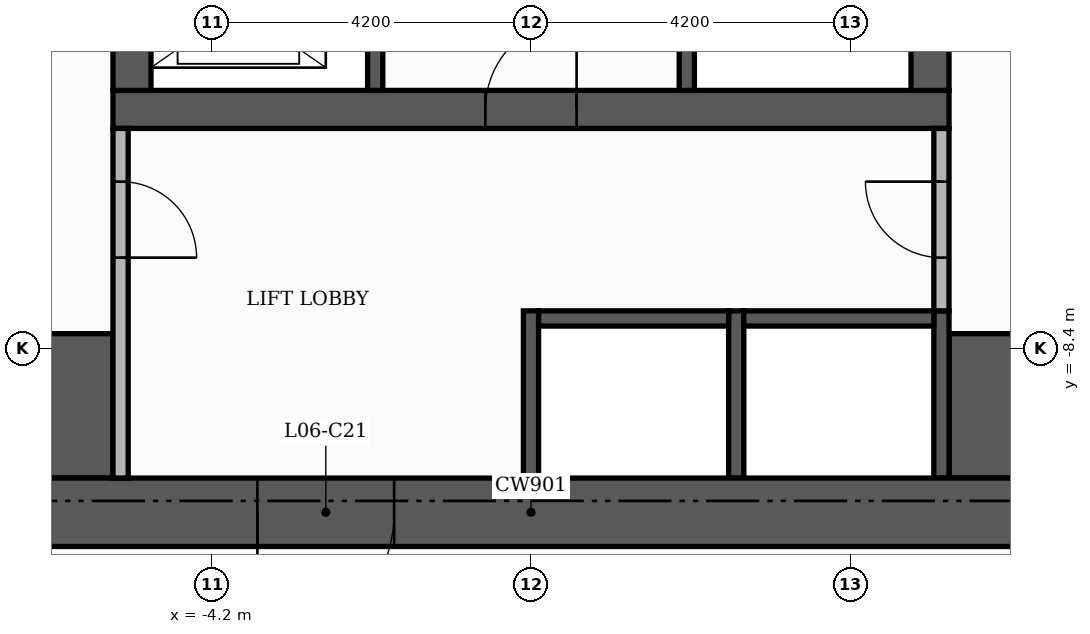
"""IFC4 building model, lengths in metres.
Left out: names, types, materials, properties, quantities, classifications, styles, units other than length and angle.
Written with IfcOpenShell. Run it as: python <this file> out.ifc"""

import sys

from ifc_helpers import new_model, si_unit, direction, frame, frame_2d, origin, place, context, subcontext, project, spatial, rectangle, extrude, element, fill, save


model = new_model("IFC4")
c1 = context("Model", 3, precision=1e-05, world=origin(), true_north=direction((0.0, 1.0)))
c2 = subcontext(c1, "Body", "Model", "MODEL_VIEW")
j1 = project(units=[si_unit("LENGTHUNIT", "METRE"), si_unit("PLANEANGLEUNIT", "RADIAN")], contexts=[c1])
p1 = place(None, origin())
s1 = spatial("IfcSite", under=j1, at=p1, CompositionType="ELEMENT")
p2 = place(p1, origin())
s2 = spatial("IfcBuilding", under=s1, at=p2, CompositionType="ELEMENT")
p3 = place(p2, frame((0.0, 0.0, 30.9)))
s3 = spatial("IfcBuildingStorey", under=s2, at=p3, CompositionType="ELEMENT", Elevation=30.9)
p4 = place(p3, frame((-5.5, -5.25, 0.0), z_axis=(0.0, 0.0, 1.0), x_axis=(1.0, 0.0, 0.0)))
e1 = element("IfcWall", 1, at=p4, inside=s3, PredefinedType="SHEAR", context=c2, shape_type="SweptSolid", body=[
    extrude(rectangle(XDim=11.0, YDim=0.5, at=frame_2d((5.5, 0.0))), origin(), (0.0, 0.0, 1.0), 3.48),
])
p5 = place(p4, frame((4.9, 0.0, 0.0)))
e2 = element("IfcOpeningElement", 2, at=p5, cuts=e1, PredefinedType="OPENING", context=c2, shape_type="SweptSolid", body=[
    extrude(rectangle(XDim=1.2, YDim=2.1, at=frame_2d((0.6, 1.05))), frame((0.0, 0.26, 0.0), z_axis=(0.0, -1.0, 0.0), x_axis=(1.0, 0.0, 0.0)), (0.0, 0.0, 1.0), 0.52),
])
for number, where, z_axis, x_axis in (
    (3, (-5.25, -5.0, 0.0), (0.0, 0.0, 1.0), (0.0, 1.0, 0.0)),
    (4, (5.25, -5.0, 0.0), (0.0, 0.0, 1.0), (0.0, 1.0, 0.0)),
):
    element("IfcWall", number, at=place(p3, frame(where, z_axis=z_axis, x_axis=x_axis)), inside=s3, PredefinedType="SHEAR", context=c2, shape_type="SweptSolid", body=[
        extrude(rectangle(XDim=10.5, YDim=0.5, at=frame_2d((5.25, 0.0))), origin(), (0.0, 0.0, 1.0), 3.48),
    ])
for number, where, z_axis, x_axis in (
    (5, (-10.1, -9.15, 0.0), (0.0, 0.0, 1.0), (1.0, 0.0, 0.0)),
    (6, (5.5, -9.15, 0.0), (0.0, 0.0, 1.0), (1.0, 0.0, 0.0)),
):
    element("IfcWall", number, at=place(p3, frame(where, z_axis=z_axis, x_axis=x_axis)), inside=s3, PredefinedType="SHEAR", context=c2, shape_type="SweptSolid", body=[
        extrude(rectangle(XDim=4.6, YDim=1.9, at=frame_2d((2.3, 0.0))), origin(), (0.0, 0.0, 1.0), 3.48),
    ])
p6 = place(p3, frame((2.05, -5.0, 0.0), z_axis=(0.0, 0.0, 1.0), x_axis=(0.0, 1.0, 0.0)))
e7 = element("IfcWall", 7, at=p6, inside=s3, PredefinedType="SHEAR", context=c2, shape_type="SweptSolid", body=[
    extrude(rectangle(XDim=6.6, YDim=0.2, at=frame_2d((3.3, 0.0))), origin(), (0.0, 0.0, 1.0), 3.48),
])
p7 = place(p6, frame((5.25, 0.0, 0.0)))
e8 = element("IfcOpeningElement", 8, at=p7, cuts=e7, PredefinedType="OPENING", context=c2, shape_type="SweptSolid", body=[
    extrude(rectangle(XDim=1.0, YDim=2.1, at=frame_2d((0.5, 1.05))), frame((0.0, 0.11, 0.0), z_axis=(0.0, -1.0, 0.0), x_axis=(1.0, 0.0, 0.0)), (0.0, 0.0, 1.0), 0.22),
])
for number, where, z_axis, x_axis in (
    (9, (0.0, -10.1, 0.0), (0.0, 0.0, 1.0), (0.0, 1.0, 0.0)),
    (10, (2.7, -10.1, 0.0), (0.0, 0.0, 1.0), (0.0, 1.0, 0.0)),
    (11, (5.4, -10.1, 0.0), (0.0, 0.0, 1.0), (0.0, 1.0, 0.0)),
):
    element("IfcWall", number, at=place(p3, frame(where, z_axis=z_axis, x_axis=x_axis)), inside=s3, PredefinedType="SHEAR", context=c2, shape_type="SweptSolid", body=[
        extrude(rectangle(XDim=2.2, YDim=0.2, at=frame_2d((1.1, 0.0))), origin(), (0.0, 0.0, 1.0), 3.48),
    ])
for number, where, z_axis, x_axis in (
    (12, (0.1, -8.0, 0.0), (0.0, 0.0, 1.0), (1.0, 0.0, 0.0)),
    (13, (2.8, -8.0, 0.0), (0.0, 0.0, 1.0), (1.0, 0.0, 0.0)),
):
    element("IfcWall", number, at=place(p3, frame(where, z_axis=z_axis, x_axis=x_axis)), inside=s3, PredefinedType="SHEAR", context=c2, shape_type="SweptSolid", body=[
        extrude(rectangle(XDim=2.5, YDim=0.2, at=frame_2d((1.25, 0.0))), origin(), (0.0, 0.0, 1.0), 3.48),
    ])
p8 = place(p3, frame((-2.05, -5.0, 0.0), z_axis=(0.0, 0.0, 1.0), x_axis=(0.0, 1.0, 0.0)))
e14 = element("IfcWall", 14, at=p8, inside=s3, PredefinedType="SHEAR", context=c2, shape_type="SweptSolid", body=[
    extrude(rectangle(XDim=3.4, YDim=0.2, at=frame_2d((1.7, 0.0))), origin(), (0.0, 0.0, 1.0), 3.48),
])
p9 = place(p8, frame((0.55, 0.0, 0.0)))
e15 = element("IfcOpeningElement", 15, at=p9, cuts=e14, PredefinedType="OPENING", context=c2, shape_type="SweptSolid", body=[
    extrude(rectangle(XDim=1.1, YDim=2.1, at=frame_2d((0.55, 1.05))), frame((0.0, 0.11, 0.0), z_axis=(0.0, -1.0, 0.0), x_axis=(1.0, 0.0, 0.0)), (0.0, 0.0, 1.0), 0.22),
])
p10 = place(p8, frame((2.45, 0.0, 0.0)))
e16 = element("IfcOpeningElement", 16, at=p10, cuts=e14, PredefinedType="OPENING", context=c2, shape_type="SweptSolid", body=[
    extrude(rectangle(XDim=0.8, YDim=2.1, at=frame_2d((0.4, 1.05))), frame((0.0, 0.11, 0.0), z_axis=(0.0, -1.0, 0.0), x_axis=(1.0, 0.0, 0.0)), (0.0, 0.0, 1.0), 0.22),
])
p11 = place(p3, frame((-11.0, -10.55, 0.0), z_axis=(0.0, 0.0, 1.0), x_axis=(1.0, 0.0, 0.0)))
e17 = element("IfcWall", 17, at=p11, inside=s3, PredefinedType="SHEAR", context=c2, shape_type="SweptSolid", body=[
    extrude(rectangle(XDim=22.0, YDim=0.9, at=frame_2d((11.0, 0.0))), origin(), (0.0, 0.0, 1.0), 3.48),
])
p12 = place(p11, frame((7.4, 0.0, 0.0)))
e18 = element("IfcOpeningElement", 18, at=p12, cuts=e17, PredefinedType="OPENING", context=c2, shape_type="SweptSolid", body=[
    extrude(rectangle(XDim=1.8, YDim=2.2, at=frame_2d((0.9, 1.1))), frame((0.0, 0.46, 0.0), z_axis=(0.0, -1.0, 0.0), x_axis=(1.0, 0.0, 0.0)), (0.0, 0.0, 1.0), 0.92),
])
p13 = place(p3, frame((-5.4, -10.1, 0.0), z_axis=(0.0, 0.0, 1.0), x_axis=(0.0, 1.0, 0.0)))
e19 = element("IfcWall", 19, at=p13, inside=s3, PredefinedType="PARTITIONING", context=c2, shape_type="SweptSolid", body=[
    extrude(rectangle(XDim=4.6, YDim=0.2, at=frame_2d((2.3, 0.0))), origin(), (0.0, 0.0, 1.0), 3.48),
])
p14 = place(p13, frame((2.9, 0.0, 0.0)))
e20 = element("IfcOpeningElement", 20, at=p14, cuts=e19, PredefinedType="OPENING", context=c2, shape_type="SweptSolid", body=[
    extrude(rectangle(XDim=1.0, YDim=2.1, at=frame_2d((0.5, 1.05))), frame((0.0, 0.11, 0.0), z_axis=(0.0, -1.0, 0.0), x_axis=(1.0, 0.0, 0.0)), (0.0, 0.0, 1.0), 0.22),
])
p15 = place(p3, frame((5.4, -7.9, 0.0), z_axis=(0.0, 0.0, 1.0), x_axis=(0.0, 1.0, 0.0)))
e21 = element("IfcWall", 21, at=p15, inside=s3, PredefinedType="PARTITIONING", context=c2, shape_type="SweptSolid", body=[
    extrude(rectangle(XDim=2.4, YDim=0.2, at=frame_2d((1.2, 0.0))), origin(), (0.0, 0.0, 1.0), 3.48),
])
p16 = place(p15, frame((0.7, 0.0, 0.0)))
e22 = element("IfcOpeningElement", 22, at=p16, cuts=e21, PredefinedType="OPENING", context=c2, shape_type="SweptSolid", body=[
    extrude(rectangle(XDim=1.0, YDim=2.1, at=frame_2d((0.5, 1.05))), frame((0.0, 0.11, 0.0), z_axis=(0.0, -1.0, 0.0), x_axis=(1.0, 0.0, 0.0)), (0.0, 0.0, 1.0), 0.22),
])
p17 = place(p5, origin())
e23 = element("IfcDoor", 23, at=p17, inside=s3, OperationType="SINGLE_SWING_RIGHT", PredefinedType="DOOR", context=c2, shape_type="SweptSolid", body=[
    extrude(rectangle(XDim=1.2, YDim=2.1, at=frame_2d((0.6, 1.05))), frame((0.0, 0.025, 0.0), z_axis=(0.0, -1.0, 0.0), x_axis=(1.0, 0.0, 0.0)), (0.0, 0.0, 1.0), 0.05),
])
fill(e2, e23)
p18 = place(p14, frame((1.0, 0.0, 0.0), z_axis=(0.0, 0.0, 1.0), x_axis=(-1.0, 0.0, 0.0)))
e24 = element("IfcDoor", 24, at=p18, inside=s3, OperationType="SINGLE_SWING_LEFT", PredefinedType="DOOR", context=c2, shape_type="SweptSolid", body=[
    extrude(rectangle(XDim=1.0, YDim=2.1, at=frame_2d((0.5, 1.05))), frame((0.0, 0.025, 0.0), z_axis=(0.0, -1.0, 0.0), x_axis=(1.0, 0.0, 0.0)), (0.0, 0.0, 1.0), 0.05),
])
fill(e20, e24)
p19 = place(p16, origin())
e25 = element("IfcDoor", 25, at=p19, inside=s3, OperationType="SINGLE_SWING_RIGHT", PredefinedType="DOOR", context=c2, shape_type="SweptSolid", body=[
    extrude(rectangle(XDim=1.0, YDim=2.1, at=frame_2d((0.5, 1.05))), frame((0.0, 0.025, 0.0), z_axis=(0.0, -1.0, 0.0), x_axis=(1.0, 0.0, 0.0)), (0.0, 0.0, 1.0), 0.05),
])
fill(e22, e25)
p20 = place(p12, frame((1.8, 0.0, 0.0), z_axis=(0.0, 0.0, 1.0), x_axis=(-1.0, 0.0, 0.0)))
e26 = element("IfcDoor", 26, at=p20, inside=s3, OperationType="DOUBLE_DOOR_SINGLE_SWING", PredefinedType="DOOR", context=c2, shape_type="SweptSolid", body=[
    extrude(rectangle(XDim=1.8, YDim=2.2, at=frame_2d((0.9, 1.1))), frame((0.0, 0.025, 0.0), z_axis=(0.0, -1.0, 0.0), x_axis=(1.0, 0.0, 0.0)), (0.0, 0.0, 1.0), 0.05),
])
fill(e18, e26)
save(model, sys.argv[1])
